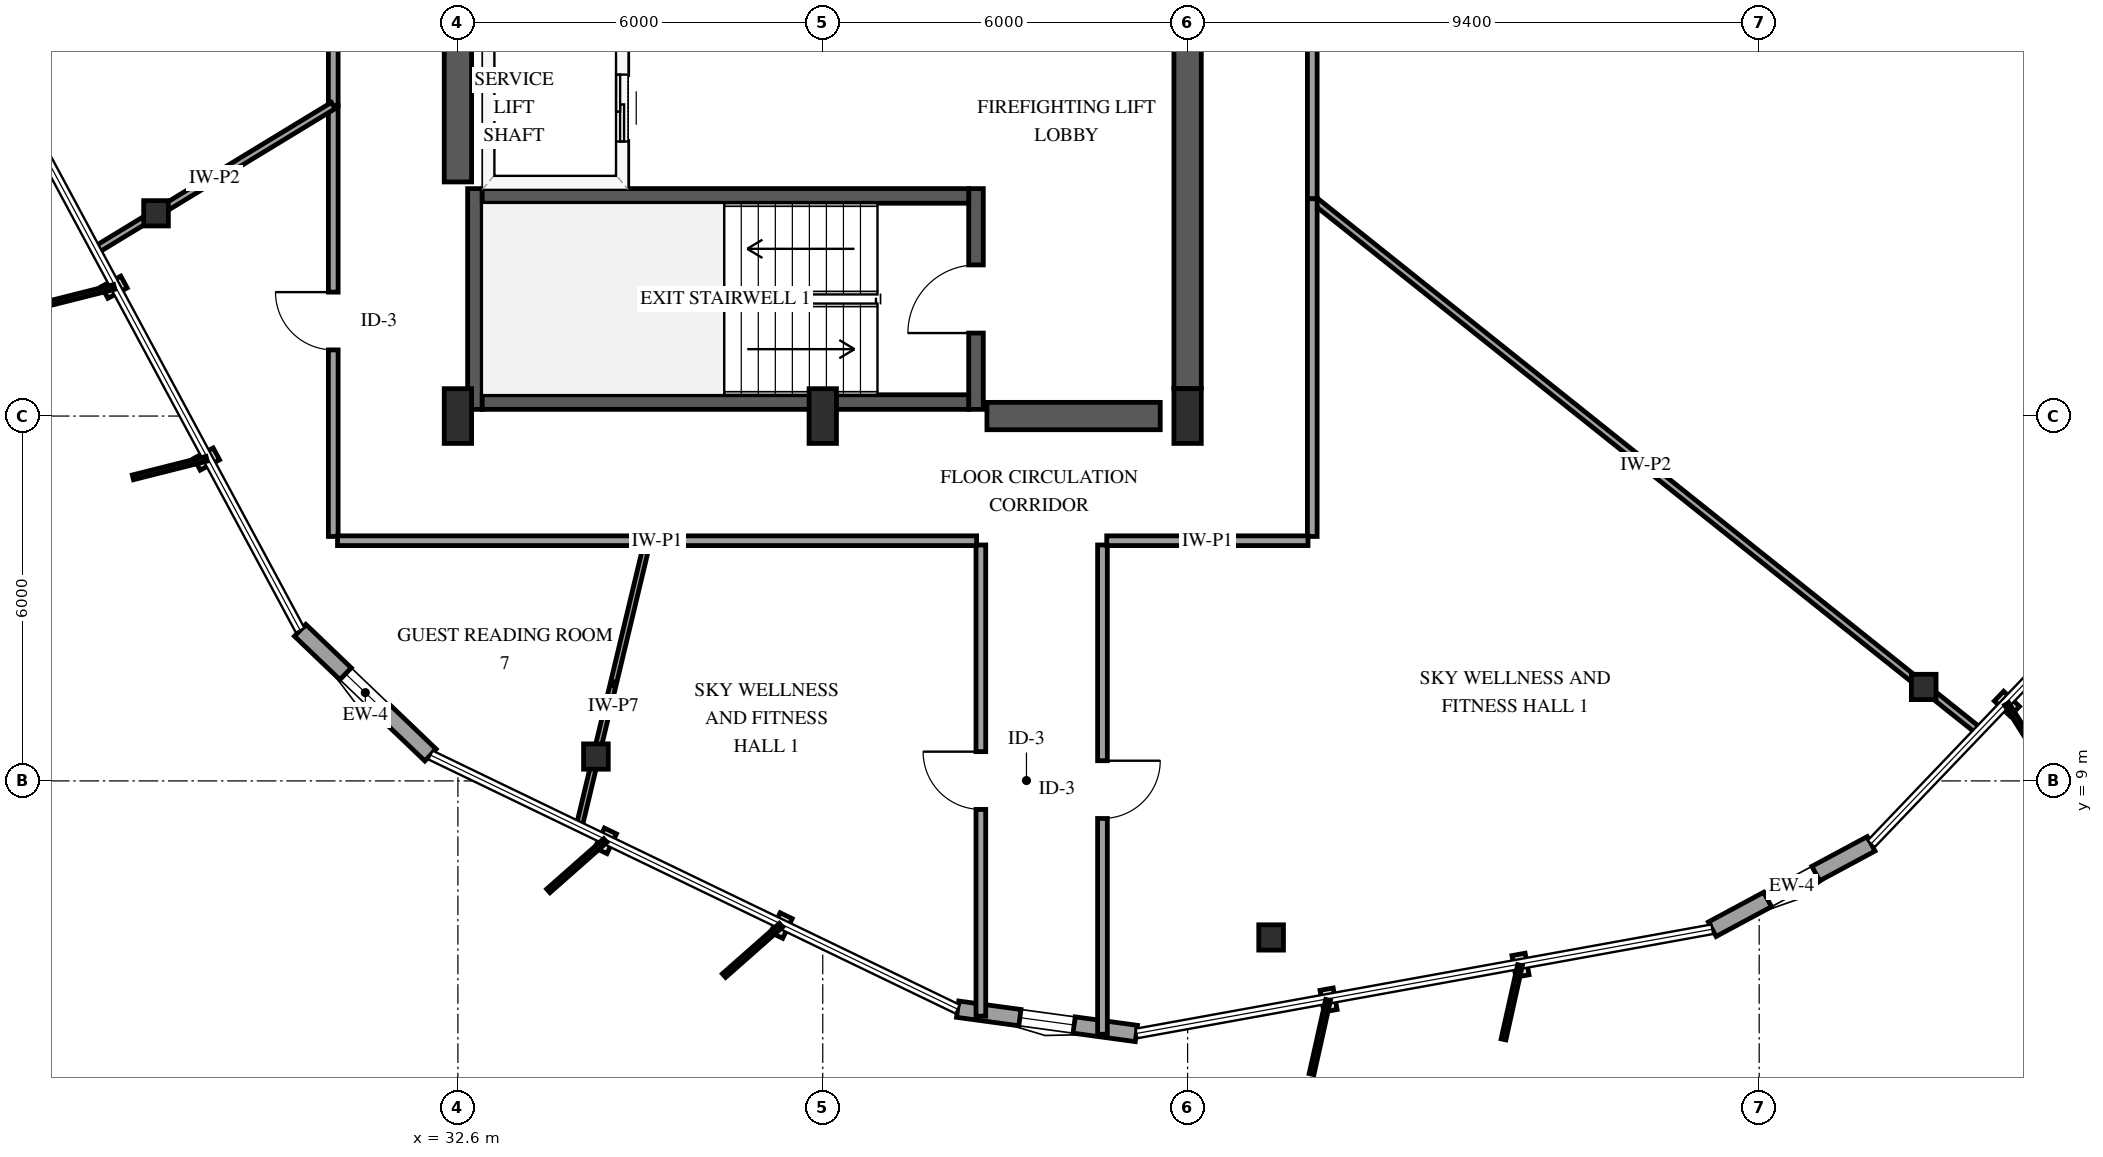
"""IFC4 building model, lengths in metres.
Left out: names, types, materials, properties, quantities, classifications, styles, units other than length and angle.
Written with IfcOpenShell. Run it as: python <this file> out.ifc"""

import sys

from ifc_helpers import new_model, si_unit, direction, frame, frame_2d, origin, origin_2d, place, context, subcontext, project, spatial, rectangle, i_section, extrude, element, fill, save


model = new_model("IFC4")
c1 = context("Model", 3, precision=1e-05, world=origin(), true_north=direction((0.0, 1.0)))
c2 = subcontext(c1, "Body", "Model", "MODEL_VIEW")
j1 = project(units=[si_unit("LENGTHUNIT", "METRE"), si_unit("PLANEANGLEUNIT", "RADIAN")], contexts=[c1])
p1 = place(None, origin())
s1 = spatial("IfcSite", under=j1, at=p1, CompositionType="ELEMENT")
p2 = place(p1, origin())
s2 = spatial("IfcBuilding", under=s1, at=p2, CompositionType="ELEMENT")
p3 = place(p2, frame((0.0, 0.0, 208.6)))
s3 = spatial("IfcBuildingStorey", under=s2, at=p3, CompositionType="ELEMENT", Elevation=208.6)
p4 = place(p3, frame((32.88, 15.11, 0.0), z_axis=(0.0, 0.0, 1.0), x_axis=(0.0, 1.0, 0.0)))
e1 = element("IfcWall", 1, at=p4, inside=s3, PredefinedType="SHEAR", context=c2, shape_type="SweptSolid", body=[
    extrude(rectangle(XDim=3.63, YDim=0.24, at=frame_2d((1.815, 0.0))), origin(), (0.0, 0.0, 1.0), 3.6),
])
p5 = place(p3, frame((41.12, 15.11, 0.0), z_axis=(0.0, 0.0, 1.0), x_axis=(0.0, 1.0, 0.0)))
e2 = element("IfcWall", 2, at=p5, inside=s3, PredefinedType="SHEAR", context=c2, shape_type="SweptSolid", body=[
    extrude(rectangle(XDim=3.63, YDim=0.24, at=frame_2d((1.815, 0.0))), origin(), (0.0, 0.0, 1.0), 3.6),
])
p6 = place(p5, frame((1.255, 0.0, 0.0)))
e3 = element("IfcOpeningElement", 3, at=p6, cuts=e2, PredefinedType="OPENING", context=c2, shape_type="SweptSolid", body=[
    extrude(rectangle(XDim=1.12, YDim=2.15, at=frame_2d((0.56, 1.075))), frame((0.0, 0.13, 0.0), z_axis=(0.0, -1.0, 0.0), x_axis=(1.0, 0.0, 0.0)), (0.0, 0.0, 1.0), 0.26),
])
for number, where, z_axis, x_axis in (
    (4, (33.0, 15.23, 0.0), (0.0, 0.0, 1.0), (1.0, 0.0, 0.0)),
    (5, (33.0, 18.62, 0.0), (0.0, 0.0, 1.0), (1.0, 0.0, 0.0)),
):
    element("IfcWall", number, at=place(p3, frame(where, z_axis=z_axis, x_axis=x_axis)), inside=s3, PredefinedType="SHEAR", context=c2, shape_type="SweptSolid", body=[
        extrude(rectangle(XDim=8.0, YDim=0.24, at=frame_2d((4.0, 0.0))), origin(), (0.0, 0.0, 1.0), 3.6),
    ])
p7 = place(p3, frame((32.6, 18.85, 0.0), z_axis=(0.0, 0.0, 1.0), x_axis=(0.0, 1.0, 0.0)))
e6 = element("IfcWall", 6, at=p7, inside=s3, PredefinedType="SHEAR", context=c2, shape_type="SweptSolid", body=[
    extrude(rectangle(XDim=12.3, YDim=0.45, at=frame_2d((6.15, 0.0))), origin(), (0.0, 0.0, 1.0), 3.6),
])
p8 = place(p3, frame((41.3, 15.0, 0.0), z_axis=(0.0, 0.0, 1.0), x_axis=(1.0, 0.0, 0.0)))
e7 = element("IfcWall", 7, at=p8, inside=s3, PredefinedType="SHEAR", context=c2, shape_type="SweptSolid", body=[
    extrude(rectangle(XDim=2.85, YDim=0.45, at=frame_2d((1.425, 0.0))), origin(), (0.0, 0.0, 1.0), 3.6),
])
p9 = place(p3, frame((44.6, 15.45, 0.0), z_axis=(0.0, 0.0, 1.0), x_axis=(0.0, 1.0, 0.0)))
e8 = element("IfcWall", 8, at=p9, inside=s3, PredefinedType="SHEAR", context=c2, shape_type="SweptSolid", body=[
    extrude(rectangle(XDim=6.35, YDim=0.45, at=frame_2d((3.175, 0.0))), origin(), (0.0, 0.0, 1.0), 3.6),
])
for number, where, z_axis, x_axis in (
    (9, (32.6, 15.0, 0.0), (0.0, 0.0, 1.0), (1.0, 0.0, 0.0)),
    (10, (38.6, 15.0, 0.0), (0.0, 0.0, 1.0), (1.0, 0.0, 0.0)),
    (11, (44.6, 15.0, 0.0), (0.0, 0.0, 1.0), (1.0, 0.0, 0.0)),
):
    element("IfcColumn", number, at=place(p3, frame(where, z_axis=z_axis, x_axis=x_axis)), inside=s3, PredefinedType="PILASTER", context=c2, shape_type="SweptSolid", body=[
        extrude(rectangle(XDim=0.45, YDim=0.9, at=origin_2d()), origin(), (0.0, 0.0, 1.0), 3.6),
    ])
for number, where, z_axis, x_axis in (
    (12, (27.635, 18.334, 0.0), (0.0, 0.0, 1.0), (1.0, 0.0, 0.0)),
    (13, (34.87, 9.401, 0.0), (0.0, 0.0, 1.0), (1.0, 0.0, 0.0)),
    (14, (45.973, 6.426, 0.0), (0.0, 0.0, 1.0), (1.0, 0.0, 0.0)),
    (15, (56.705, 10.545, 0.0), (0.0, 0.0, 1.0), (1.0, 0.0, 0.0)),
):
    element("IfcColumn", number, at=place(p3, frame(where, z_axis=z_axis, x_axis=x_axis)), inside=s3, PredefinedType="COLUMN", context=c2, shape_type="SweptSolid", body=[
        extrude(i_section(OverallWidth=0.406, OverallDepth=0.416, WebThickness=0.03, FlangeThickness=0.048, FilletRadius=0.038, at=origin_2d()), origin(), (0.0, 0.0, 1.0), 3.6),
    ])
p10 = place(p3, frame((30.006, 11.477, 0.0), z_axis=(0.0, 0.0, 1.0), x_axis=(0.722489918311, -0.691381456172, 0.0)))
e16 = element("IfcWall", 16, at=p10, inside=s3, PredefinedType="SOLIDWALL", context=c2, shape_type="SweptSolid", body=[
    extrude(rectangle(XDim=2.967, YDim=0.27, at=frame_2d((1.483, 0.0))), origin(), (0.0, 0.0, 1.0), 2.679),
])
p11 = place(p10, frame((1.033, 0.0, 0.75)))
e17 = element("IfcOpeningElement", 17, at=p11, cuts=e16, PredefinedType="OPENING", context=c2, shape_type="SweptSolid", body=[
    extrude(rectangle(XDim=0.9, YDim=1.5, at=frame_2d((0.45, 0.75))), frame((0.0, 0.145, 0.0), z_axis=(0.0, -1.0, 0.0), x_axis=(1.0, 0.0, 0.0)), (0.0, 0.0, 1.0), 0.29),
])
p12 = place(p3, frame((40.818, 5.246, 0.0), z_axis=(0.0, 0.0, 1.0), x_axis=(0.990884670692, -0.134712914702, 0.0)))
e18 = element("IfcWall", 18, at=p12, inside=s3, PredefinedType="SOLIDWALL", context=c2, shape_type="SweptSolid", body=[
    extrude(rectangle(XDim=2.967, YDim=0.27, at=frame_2d((1.483, 0.0))), origin(), (0.0, 0.0, 1.0), 2.679),
])
p13 = place(p12, frame((1.033, 0.0, 0.75)))
e19 = element("IfcOpeningElement", 19, at=p13, cuts=e18, PredefinedType="OPENING", context=c2, shape_type="SweptSolid", body=[
    extrude(rectangle(XDim=0.9, YDim=1.5, at=frame_2d((0.45, 0.75))), frame((0.0, 0.145, 0.0), z_axis=(0.0, -1.0, 0.0), x_axis=(1.0, 0.0, 0.0)), (0.0, 0.0, 1.0), 0.29),
])
p14 = place(p3, frame((53.228, 6.561, 0.0), z_axis=(0.0, 0.0, 1.0), x_axis=(0.880819678066, 0.473451892732, 0.0)))
e20 = element("IfcWall", 20, at=p14, inside=s3, PredefinedType="SOLIDWALL", context=c2, shape_type="SweptSolid", body=[
    extrude(rectangle(XDim=2.967, YDim=0.27, at=frame_2d((1.483, 0.0))), origin(), (0.0, 0.0, 1.0), 2.679),
])
p15 = place(p14, frame((1.033, 0.0, 0.75)))
e21 = element("IfcOpeningElement", 21, at=p15, cuts=e20, PredefinedType="OPENING", context=c2, shape_type="SweptSolid", body=[
    extrude(rectangle(XDim=0.9, YDim=1.5, at=frame_2d((0.45, 0.75))), frame((0.0, 0.145, 0.0), z_axis=(0.0, -1.0, 0.0), x_axis=(1.0, 0.0, 0.0)), (0.0, 0.0, 1.0), 0.29),
])
p16 = place(p3, frame((35.3, 18.79, 0.0), z_axis=(0.0, 0.0, 1.0), x_axis=(0.0, 1.0, 0.0)))
e22 = element("IfcWall", 22, at=p16, inside=s3, PredefinedType="SOLIDWALL", context=c2, shape_type="SweptSolid", body=[
    extrude(rectangle(XDim=2.55, YDim=0.185, at=frame_2d((1.275, 0.0))), origin(), (0.0, 0.0, 1.0), 3.3),
])
p17 = place(p16, frame((0.725, 0.0, 0.0)))
e23 = element("IfcOpeningElement", 23, at=p17, cuts=e22, PredefinedType="OPENING", context=c2, shape_type="SweptSolid", body=[
    extrude(rectangle(XDim=1.1, YDim=2.15, at=frame_2d((0.55, 1.075))), frame((0.0, 0.103, 0.0), z_axis=(0.0, -1.0, 0.0), x_axis=(1.0, 0.0, 0.0)), (0.0, 0.0, 1.0), 0.205),
])
p18 = place(p3, frame((46.65, 18.573, 0.0), z_axis=(0.0, 0.0, 1.0), x_axis=(0.781499914216, -0.623905348655, 0.0)))
e24 = element("IfcWall", 24, at=p18, inside=s3, PredefinedType="PARTITIONING", context=c2, shape_type="SweptSolid", body=[
    extrude(rectangle(XDim=14.031, YDim=0.12, at=frame_2d((7.015, 0.0))), origin(), (0.0, 0.0, 1.0), 3.3),
])
p19 = place(p3, frame((46.65, 27.258, 0.0), z_axis=(0.0, 0.0, 1.0), x_axis=(0.0, -1.0, 0.0)))
e25 = element("IfcWall", 25, at=p19, inside=s3, PredefinedType="PARTITIONING", context=c2, shape_type="SweptSolid", body=[
    extrude(rectangle(XDim=8.685, YDim=0.16, at=frame_2d((4.343, 0.0))), origin(), (0.0, 0.0, 1.0), 3.3),
])
p20 = place(p19, frame((3.867, 0.0, 0.0)))
e26 = element("IfcOpeningElement", 26, at=p20, cuts=e25, PredefinedType="OPENING", context=c2, shape_type="SweptSolid", body=[
    extrude(rectangle(XDim=0.95, YDim=2.15, at=frame_2d((0.475, 1.075))), frame((0.0, 0.09, 0.0), z_axis=(0.0, -1.0, 0.0), x_axis=(1.0, 0.0, 0.0)), (0.0, 0.0, 1.0), 0.18),
])
p21 = place(p3, frame((30.55, 20.106, 0.0), z_axis=(0.0, 0.0, 1.0), x_axis=(0.0, 1.0, 0.0)))
e27 = element("IfcWall", 27, at=p21, inside=s3, PredefinedType="PARTITIONING", context=c2, shape_type="SweptSolid", body=[
    extrude(rectangle(XDim=8.245, YDim=0.16, at=frame_2d((4.123, 0.0))), origin(), (0.0, 0.0, 1.0), 3.3),
])
p22 = place(p21, frame((3.647, 0.0, 0.0)))
e28 = element("IfcOpeningElement", 28, at=p22, cuts=e27, PredefinedType="OPENING", context=c2, shape_type="SweptSolid", body=[
    extrude(rectangle(XDim=0.95, YDim=2.15, at=frame_2d((0.475, 1.075))), frame((0.0, 0.09, 0.0), z_axis=(0.0, -1.0, 0.0), x_axis=(1.0, 0.0, 0.0)), (0.0, 0.0, 1.0), 0.18),
])
p23 = place(p3, frame((43.2, 12.88, 0.0), z_axis=(0.0, 0.0, 1.0), x_axis=(0.0, -1.0, 0.0)))
e29 = element("IfcWall", 29, at=p23, inside=s3, PredefinedType="PARTITIONING", context=c2, shape_type="SweptSolid", body=[
    extrude(rectangle(XDim=8.046, YDim=0.16, at=frame_2d((4.023, 0.0))), origin(), (0.0, 0.0, 1.0), 2.678),
])
p24 = place(p23, frame((3.548, 0.0, 0.0)))
e30 = element("IfcOpeningElement", 30, at=p24, cuts=e29, PredefinedType="OPENING", context=c2, shape_type="SweptSolid", body=[
    extrude(rectangle(XDim=0.95, YDim=2.15, at=frame_2d((0.475, 1.075))), frame((0.0, 0.09, 0.0), z_axis=(0.0, -1.0, 0.0), x_axis=(1.0, 0.0, 0.0)), (0.0, 0.0, 1.0), 0.18),
])
p25 = place(p3, frame((41.2, 5.131, 0.0), z_axis=(0.0, 0.0, 1.0), x_axis=(0.0, 1.0, 0.0)))
e31 = element("IfcWall", 31, at=p25, inside=s3, PredefinedType="PARTITIONING", context=c2, shape_type="SweptSolid", body=[
    extrude(rectangle(XDim=7.749, YDim=0.16, at=frame_2d((3.875, 0.0))), origin(), (0.0, 0.0, 1.0), 3.3),
])
p26 = place(p25, frame((3.4, 0.0, 0.0)))
e32 = element("IfcOpeningElement", 32, at=p26, cuts=e31, PredefinedType="OPENING", context=c2, shape_type="SweptSolid", body=[
    extrude(rectangle(XDim=0.95, YDim=2.15, at=frame_2d((0.475, 1.075))), frame((0.0, 0.09, 0.0), z_axis=(0.0, -1.0, 0.0), x_axis=(1.0, 0.0, 0.0)), (0.0, 0.0, 1.0), 0.18),
])
p27 = place(p3, frame((30.55, 13.02, 0.0), z_axis=(0.0, 0.0, 1.0), x_axis=(0.0, 1.0, 0.0)))
e33 = element("IfcWall", 33, at=p27, inside=s3, PredefinedType="PARTITIONING", context=c2, shape_type="SweptSolid", body=[
    extrude(rectangle(XDim=7.086, YDim=0.16, at=frame_2d((3.543, 0.0))), origin(), (0.0, 0.0, 1.0), 3.3),
])
p28 = place(p27, frame((3.068, 0.0, 0.0)))
e34 = element("IfcOpeningElement", 34, at=p28, cuts=e33, PredefinedType="OPENING", context=c2, shape_type="SweptSolid", body=[
    extrude(rectangle(XDim=0.95, YDim=2.15, at=frame_2d((0.475, 1.075))), frame((0.0, 0.09, 0.0), z_axis=(0.0, -1.0, 0.0), x_axis=(1.0, 0.0, 0.0)), (0.0, 0.0, 1.0), 0.18),
])
p29 = place(p3, frame((46.65, 18.573, 0.0), z_axis=(0.0, 0.0, 1.0), x_axis=(0.0, -1.0, 0.0)))
e35 = element("IfcWall", 35, at=p29, inside=s3, PredefinedType="PARTITIONING", context=c2, shape_type="SweptSolid", body=[
    extrude(rectangle(XDim=5.553, YDim=0.16, at=frame_2d((2.776, 0.0))), origin(), (0.0, 0.0, 1.0), 3.3),
])
p30 = place(p3, frame((41.13, 12.95, 0.0), z_axis=(0.0, 0.0, 1.0), x_axis=(-1.0, 0.0, 0.0)))
e36 = element("IfcWall", 36, at=p30, inside=s3, PredefinedType="PARTITIONING", context=c2, shape_type="SweptSolid", body=[
    extrude(rectangle(XDim=5.411, YDim=0.16, at=frame_2d((2.706, 0.0))), origin(), (0.0, 0.0, 1.0), 3.3),
])
p31 = place(p3, frame((35.719, 12.95, 0.0), z_axis=(0.0, 0.0, 1.0), x_axis=(-1.0, 0.0, 0.0)))
e37 = element("IfcWall", 37, at=p31, inside=s3, PredefinedType="PARTITIONING", context=c2, shape_type="SweptSolid", body=[
    extrude(rectangle(XDim=5.099, YDim=0.16, at=frame_2d((2.549, 0.0))), origin(), (0.0, 0.0, 1.0), 3.3),
])
p32 = place(p3, frame((35.719, 12.95, 0.0), z_axis=(0.0, 0.0, 1.0), x_axis=(-0.232842087614, -0.97251455631, 0.0)))
e38 = element("IfcWall", 38, at=p32, inside=s3, PredefinedType="PARTITIONING", context=c2, shape_type="SweptSolid", body=[
    extrude(rectangle(XDim=4.836, YDim=0.1, at=frame_2d((2.418, 0.0))), origin(), (0.0, 0.0, 1.0), 2.595),
])
p33 = place(p3, frame((30.55, 20.106, 0.0), z_axis=(0.0, 0.0, 1.0), x_axis=(-0.854448030562, -0.519536873637, 0.0)))
e39 = element("IfcWall", 39, at=p33, inside=s3, PredefinedType="PARTITIONING", context=c2, shape_type="SweptSolid", body=[
    extrude(rectangle(XDim=4.571, YDim=0.12, at=frame_2d((2.286, 0.0))), origin(), (0.0, 0.0, 1.0), 3.3),
])
p34 = place(p3, frame((46.58, 12.95, 0.0), z_axis=(0.0, 0.0, 1.0), x_axis=(-1.0, 0.0, 0.0)))
e40 = element("IfcWall", 40, at=p34, inside=s3, PredefinedType="PARTITIONING", context=c2, shape_type="SweptSolid", body=[
    extrude(rectangle(XDim=3.31, YDim=0.16, at=frame_2d((1.655, 0.0))), origin(), (0.0, 0.0, 1.0), 3.3),
])
p35 = place(p11, origin())
e41 = element("IfcWindow", 41, at=p35, inside=s3, PartitioningType="SINGLE_PANEL", PredefinedType="WINDOW", context=c2, shape_type="SweptSolid", body=[
    extrude(rectangle(XDim=0.9, YDim=1.5, at=frame_2d((0.45, 0.75))), frame((0.0, 0.03, 0.0), z_axis=(0.0, -1.0, 0.0), x_axis=(1.0, 0.0, 0.0)), (0.0, 0.0, 1.0), 0.06),
])
fill(e17, e41)
p36 = place(p13, origin())
e42 = element("IfcWindow", 42, at=p36, inside=s3, PartitioningType="SINGLE_PANEL", PredefinedType="WINDOW", context=c2, shape_type="SweptSolid", body=[
    extrude(rectangle(XDim=0.9, YDim=1.5, at=frame_2d((0.45, 0.75))), frame((0.0, 0.03, 0.0), z_axis=(0.0, -1.0, 0.0), x_axis=(1.0, 0.0, 0.0)), (0.0, 0.0, 1.0), 0.06),
])
fill(e19, e42)
p37 = place(p15, origin())
e43 = element("IfcWindow", 43, at=p37, inside=s3, PartitioningType="SINGLE_PANEL", PredefinedType="WINDOW", context=c2, shape_type="SweptSolid", body=[
    extrude(rectangle(XDim=0.9, YDim=1.5, at=frame_2d((0.45, 0.75))), frame((0.0, 0.03, 0.0), z_axis=(0.0, -1.0, 0.0), x_axis=(1.0, 0.0, 0.0)), (0.0, 0.0, 1.0), 0.06),
])
fill(e21, e43)
p38 = place(p17, origin())
e44 = element("IfcDoor", 44, at=p38, inside=s3, OperationType="SLIDING_TO_LEFT", PredefinedType="DOOR", context=c2, shape_type="SweptSolid", body=[
    extrude(rectangle(XDim=1.1, YDim=2.15, at=frame_2d((0.55, 1.075))), frame((0.0, 0.025, 0.0), z_axis=(0.0, -1.0, 0.0), x_axis=(1.0, 0.0, 0.0)), (0.0, 0.0, 1.0), 0.05),
])
fill(e23, e44)
p39 = place(p6, origin())
e45 = element("IfcDoor", 45, at=p39, inside=s3, OperationType="SINGLE_SWING_LEFT", PredefinedType="DOOR", context=c2, shape_type="SweptSolid", body=[
    extrude(rectangle(XDim=1.12, YDim=2.15, at=frame_2d((0.56, 1.075))), frame((0.0, 0.025, 0.0), z_axis=(0.0, -1.0, 0.0), x_axis=(1.0, 0.0, 0.0)), (0.0, 0.0, 1.0), 0.05),
])
fill(e3, e45)
p40 = place(p24, origin())
e46 = element("IfcDoor", 46, at=p40, inside=s3, OperationType="SINGLE_SWING_LEFT", PredefinedType="DOOR", context=c2, shape_type="SweptSolid", body=[
    extrude(rectangle(XDim=0.95, YDim=2.15, at=frame_2d((0.475, 1.075))), frame((0.0, 0.025, 0.0), z_axis=(0.0, -1.0, 0.0), x_axis=(1.0, 0.0, 0.0)), (0.0, 0.0, 1.0), 0.05),
])
fill(e30, e46)
p41 = place(p26, origin())
e47 = element("IfcDoor", 47, at=p41, inside=s3, OperationType="SINGLE_SWING_RIGHT", PredefinedType="DOOR", context=c2, shape_type="SweptSolid", body=[
    extrude(rectangle(XDim=0.95, YDim=2.15, at=frame_2d((0.475, 1.075))), frame((0.0, 0.025, 0.0), z_axis=(0.0, -1.0, 0.0), x_axis=(1.0, 0.0, 0.0)), (0.0, 0.0, 1.0), 0.05),
])
fill(e32, e47)
p42 = place(p28, origin())
e48 = element("IfcDoor", 48, at=p42, inside=s3, OperationType="SINGLE_SWING_RIGHT", PredefinedType="DOOR", context=c2, shape_type="SweptSolid", body=[
    extrude(rectangle(XDim=0.95, YDim=2.15, at=frame_2d((0.475, 1.075))), frame((0.0, 0.025, 0.0), z_axis=(0.0, -1.0, 0.0), x_axis=(1.0, 0.0, 0.0)), (0.0, 0.0, 1.0), 0.05),
])
fill(e34, e48)
save(model, sys.argv[1])
